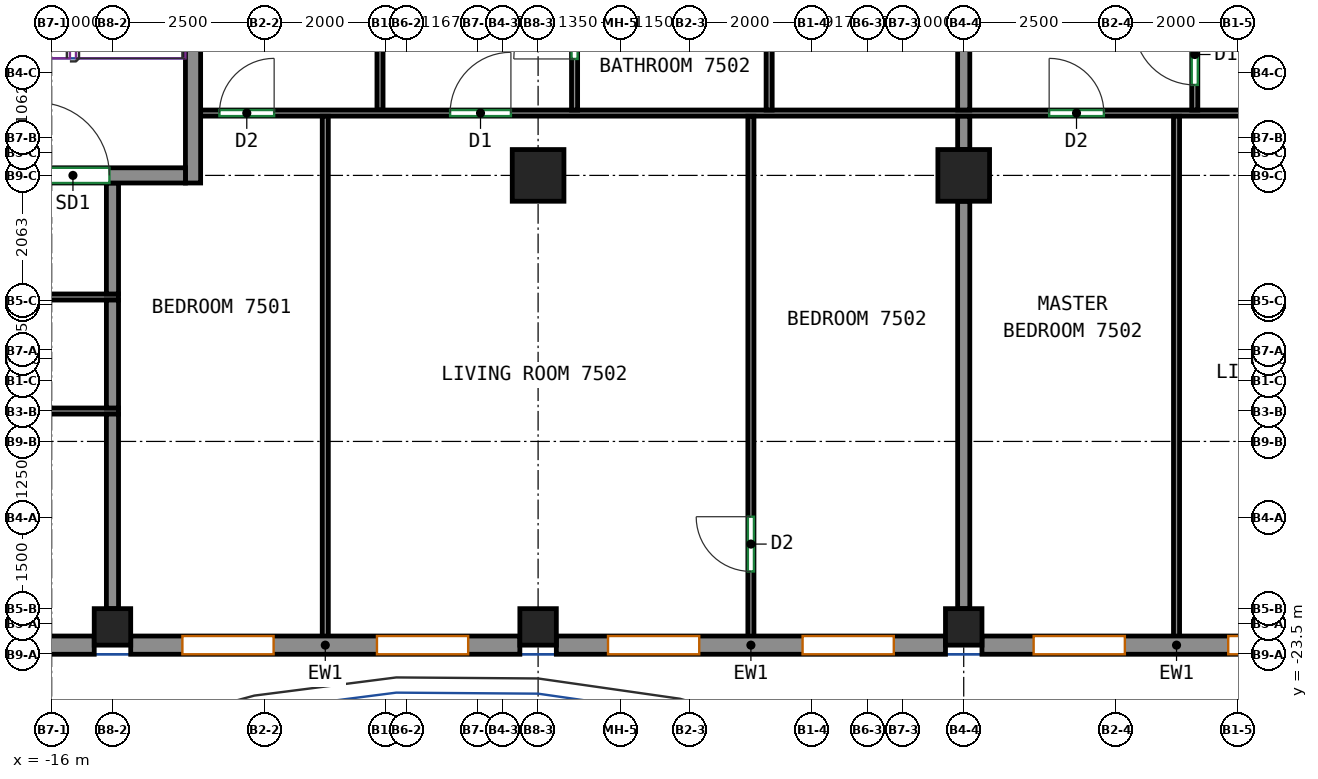
"""IFC4 building model, lengths in metres.
Left out: names, types, materials, properties, quantities, classifications, styles, units other than length and angle.
Written with IfcOpenShell. Run it as: python <this file> out.ifc"""

import sys

from ifc_helpers import new_model, si_unit, direction, frame, frame_2d, origin, origin_2d, place, context, subcontext, project, spatial, rectangle, extrude, source, transform, mapped, element, fill, save


model = new_model("IFC4")
c1 = context("Model", 3, precision=1e-05, world=origin(), true_north=direction((0.0, 1.0)))
c2 = subcontext(c1, "Body", "Model", "MODEL_VIEW")
j1 = project(units=[si_unit("LENGTHUNIT", "METRE"), si_unit("PLANEANGLEUNIT", "RADIAN")], contexts=[c1])
p1 = place(None, origin())
s1 = spatial("IfcSite", under=j1, at=p1, CompositionType="ELEMENT")
p2 = place(p1, origin())
s2 = spatial("IfcBuilding", under=s1, at=p2, CompositionType="ELEMENT")
p3 = place(p2, frame((0.0, 0.0, 301.8)))
s3 = spatial("IfcBuildingStorey", under=s2, at=p3, CompositionType="ELEMENT", Elevation=301.8)
m1 = source(origin(), c2, "Body", "SweptSolid", [
    extrude(rectangle(XDim=0.6, YDim=0.6, at=origin_2d()), origin(), (0.0, 0.0, 1.0), 3.12),
])
for number, where, z_axis, x_axis in (
    (1, (-15.0, -23.05, 0.0), (0.0, 0.0, 1.0), (1.0, 0.0, 0.0)),
    (2, (-8.0, -23.05, 0.0), (0.0, 0.0, 1.0), (1.0, 0.0, 0.0)),
):
    element("IfcColumn", number, at=place(p3, frame(where, z_axis=z_axis, x_axis=x_axis)), inside=s3, PredefinedType="COLUMN", context=c2, shape_type="MappedRepresentation", body=[
        mapped(m1, transform((0.0, 0.0, 0.0))),
    ])
m2 = source(origin(), c2, "Body", "SweptSolid", [
    extrude(rectangle(XDim=0.85, YDim=0.85, at=origin_2d()), origin(), (0.0, 0.0, 1.0), 3.12),
])
p4 = place(p3, frame((-8.0, -15.625, 0.0), z_axis=(0.0, 0.0, 1.0), x_axis=(1.0, 0.0, 0.0)))
e3 = element("IfcColumn", 3, at=p4, inside=s3, PredefinedType="COLUMN", context=c2, shape_type="MappedRepresentation", body=[
    mapped(m2, transform((0.0, 0.0, 0.0))),
])
p5 = place(p3, frame((-1.0, -23.05, 0.0), z_axis=(0.0, 0.0, 1.0), x_axis=(1.0, 0.0, 0.0)))
e4 = element("IfcColumn", 4, at=p5, inside=s3, PredefinedType="COLUMN", context=c2, shape_type="MappedRepresentation", body=[
    mapped(m1, transform((0.0, 0.0, 0.0))),
])
p6 = place(p3, frame((-1.0, -15.625, 0.0), z_axis=(0.0, 0.0, 1.0), x_axis=(1.0, 0.0, 0.0)))
e5 = element("IfcColumn", 5, at=p6, inside=s3, PredefinedType="COLUMN", context=c2, shape_type="MappedRepresentation", body=[
    mapped(m2, transform((0.0, 0.0, 0.0))),
])
m3 = source(origin(), c2, "Body", "SweptSolid", [
    extrude(rectangle(XDim=8.0, YDim=0.25, at=frame_2d((4.0, 0.0))), origin(), (0.0, 0.0, 1.0), 3.12),
])
p7 = place(p3, frame((-13.675, -15.75, 0.0), z_axis=(0.0, 0.0, 1.0), x_axis=(0.0, 1.0, 0.0)))
e6 = element("IfcWall", 6, at=p7, inside=s3, PredefinedType="SHEAR", context=c2, shape_type="MappedRepresentation", body=[
    mapped(m3, transform((0.0, 0.0, 0.0))),
])
m4 = source(origin(), c2, "Body", "SweptSolid", [
    extrude(rectangle(XDim=3.7, YDim=0.25, at=frame_2d((1.85, 0.0))), origin(), (0.0, 0.0, 1.0), 3.12),
])
p8 = place(p3, frame((-17.5, -15.625, 0.0), z_axis=(0.0, 0.0, 1.0), x_axis=(1.0, 0.0, 0.0)))
e7 = element("IfcWall", 7, at=p8, inside=s3, PredefinedType="SHEAR", context=c2, shape_type="MappedRepresentation", body=[
    mapped(m4, transform((0.0, 0.0, 0.0))),
])
p9 = place(p8, frame((1.25, 0.0, 0.0)))
e8 = element("IfcOpeningElement", 8, at=p9, cuts=e7, PredefinedType="OPENING", context=c2, shape_type="SweptSolid", body=[
    extrude(rectangle(XDim=1.2, YDim=2.1, at=frame_2d((0.6, 1.05))), frame((0.0, 0.135, 0.0), z_axis=(0.0, -1.0, 0.0), x_axis=(1.0, 0.0, 0.0)), (0.0, 0.0, 1.0), 0.27),
])
m5 = source(origin(), c2, "Body", "SweptSolid", [
    extrude(rectangle(XDim=6.4, YDim=0.3, at=frame_2d((3.2, 0.0))), origin(), (0.0, 0.0, 1.0), 3.12),
])
p10 = place(p3, frame((-21.7, -23.35, 0.0), z_axis=(0.0, 0.0, 1.0), x_axis=(1.0, 0.0, 0.0)))
e9 = element("IfcWall", 9, at=p10, inside=s3, PredefinedType="SOLIDWALL", context=c2, shape_type="MappedRepresentation", body=[
    mapped(m5, transform((0.0, 0.0, 0.0))),
])
p11 = place(p10, frame((0.85, 0.0, 0.8)))
e10 = element("IfcOpeningElement", 10, at=p11, cuts=e9, PredefinedType="OPENING", context=c2, shape_type="SweptSolid", body=[
    extrude(rectangle(XDim=1.5, YDim=2.05, at=frame_2d((0.75, 1.025))), frame((0.0, 0.16, 0.0), z_axis=(0.0, -1.0, 0.0), x_axis=(1.0, 0.0, 0.0)), (0.0, 0.0, 1.0), 0.32),
])
p12 = place(p10, frame((4.05, 0.0, 0.8)))
e11 = element("IfcOpeningElement", 11, at=p12, cuts=e9, PredefinedType="OPENING", context=c2, shape_type="SweptSolid", body=[
    extrude(rectangle(XDim=1.5, YDim=2.05, at=frame_2d((0.75, 1.025))), frame((0.0, 0.16, 0.0), z_axis=(0.0, -1.0, 0.0), x_axis=(1.0, 0.0, 0.0)), (0.0, 0.0, 1.0), 0.32),
])
p13 = place(p3, frame((-14.7, -23.35, 0.0), z_axis=(0.0, 0.0, 1.0), x_axis=(1.0, 0.0, 0.0)))
e12 = element("IfcWall", 12, at=p13, inside=s3, PredefinedType="SOLIDWALL", context=c2, shape_type="MappedRepresentation", body=[
    mapped(m5, transform((0.0, 0.0, 0.0))),
])
p14 = place(p13, frame((0.85, 0.0, 0.8)))
e13 = element("IfcOpeningElement", 13, at=p14, cuts=e12, PredefinedType="OPENING", context=c2, shape_type="SweptSolid", body=[
    extrude(rectangle(XDim=1.5, YDim=2.05, at=frame_2d((0.75, 1.025))), frame((0.0, 0.16, 0.0), z_axis=(0.0, -1.0, 0.0), x_axis=(1.0, 0.0, 0.0)), (0.0, 0.0, 1.0), 0.32),
])
p15 = place(p13, frame((4.05, 0.0, 0.8)))
e14 = element("IfcOpeningElement", 14, at=p15, cuts=e12, PredefinedType="OPENING", context=c2, shape_type="SweptSolid", body=[
    extrude(rectangle(XDim=1.5, YDim=2.05, at=frame_2d((0.75, 1.025))), frame((0.0, 0.16, 0.0), z_axis=(0.0, -1.0, 0.0), x_axis=(1.0, 0.0, 0.0)), (0.0, 0.0, 1.0), 0.32),
])
p16 = place(p3, frame((-7.7, -23.35, 0.0), z_axis=(0.0, 0.0, 1.0), x_axis=(1.0, 0.0, 0.0)))
e15 = element("IfcWall", 15, at=p16, inside=s3, PredefinedType="SOLIDWALL", context=c2, shape_type="MappedRepresentation", body=[
    mapped(m5, transform((0.0, 0.0, 0.0))),
])
p17 = place(p16, frame((0.85, 0.0, 0.8)))
e16 = element("IfcOpeningElement", 16, at=p17, cuts=e15, PredefinedType="OPENING", context=c2, shape_type="SweptSolid", body=[
    extrude(rectangle(XDim=1.5, YDim=2.05, at=frame_2d((0.75, 1.025))), frame((0.0, 0.16, 0.0), z_axis=(0.0, -1.0, 0.0), x_axis=(1.0, 0.0, 0.0)), (0.0, 0.0, 1.0), 0.32),
])
p18 = place(p16, frame((4.05, 0.0, 0.8)))
e17 = element("IfcOpeningElement", 17, at=p18, cuts=e15, PredefinedType="OPENING", context=c2, shape_type="SweptSolid", body=[
    extrude(rectangle(XDim=1.5, YDim=2.05, at=frame_2d((0.75, 1.025))), frame((0.0, 0.16, 0.0), z_axis=(0.0, -1.0, 0.0), x_axis=(1.0, 0.0, 0.0)), (0.0, 0.0, 1.0), 0.32),
])
p19 = place(p3, frame((-0.7, -23.35, 0.0), z_axis=(0.0, 0.0, 1.0), x_axis=(1.0, 0.0, 0.0)))
e18 = element("IfcWall", 18, at=p19, inside=s3, PredefinedType="SOLIDWALL", context=c2, shape_type="MappedRepresentation", body=[
    mapped(m5, transform((0.0, 0.0, 0.0))),
])
p20 = place(p19, frame((0.85, 0.0, 0.8)))
e19 = element("IfcOpeningElement", 19, at=p20, cuts=e18, PredefinedType="OPENING", context=c2, shape_type="SweptSolid", body=[
    extrude(rectangle(XDim=1.5, YDim=2.05, at=frame_2d((0.75, 1.025))), frame((0.0, 0.16, 0.0), z_axis=(0.0, -1.0, 0.0), x_axis=(1.0, 0.0, 0.0)), (0.0, 0.0, 1.0), 0.32),
])
p21 = place(p19, frame((4.05, 0.0, 0.8)))
e20 = element("IfcOpeningElement", 20, at=p21, cuts=e18, PredefinedType="OPENING", context=c2, shape_type="SweptSolid", body=[
    extrude(rectangle(XDim=1.5, YDim=2.05, at=frame_2d((0.75, 1.025))), frame((0.0, 0.16, 0.0), z_axis=(0.0, -1.0, 0.0), x_axis=(1.0, 0.0, 0.0)), (0.0, 0.0, 1.0), 0.32),
])
p22 = place(p3, frame((-14.9, -19.5, 0.0), z_axis=(0.0, 0.0, 1.0), x_axis=(-1.0, 0.0, 0.0)))
e21 = element("IfcWall", 21, at=p22, inside=s3, PredefinedType="PARTITIONING", context=c2, shape_type="SweptSolid", body=[
    extrude(rectangle(XDim=10.35, YDim=0.1, at=frame_2d((5.175, 0.0))), origin(), (0.0, 0.0, 1.0), 3.12),
])
p23 = place(p22, frame((1.206, 0.0, 0.0)))
e22 = element("IfcOpeningElement", 22, at=p23, cuts=e21, PredefinedType="OPENING", context=c2, shape_type="SweptSolid", body=[
    extrude(rectangle(XDim=0.9, YDim=2.1, at=frame_2d((0.45, 1.05))), frame((0.0, 0.06, 0.0), z_axis=(0.0, -1.0, 0.0), x_axis=(1.0, 0.0, 0.0)), (0.0, 0.0, 1.0), 0.12),
])
p24 = place(p3, frame((-15.0, -22.75, 0.0), z_axis=(0.0, 0.0, 1.0), x_axis=(0.0, 1.0, 0.0)))
e23 = element("IfcWall", 23, at=p24, inside=s3, PredefinedType="PARTITIONING", context=c2, shape_type="SweptSolid", body=[
    extrude(rectangle(XDim=3.2, YDim=0.2, at=frame_2d((1.6, 0.0))), origin(), (0.0, 0.0, 1.0), 3.12),
])
p25 = place(p3, frame((-14.9, -17.625, 0.0), z_axis=(0.0, 0.0, 1.0), x_axis=(-1.0, 0.0, 0.0)))
e24 = element("IfcWall", 24, at=p25, inside=s3, PredefinedType="PARTITIONING", context=c2, shape_type="SweptSolid", body=[
    extrude(rectangle(XDim=10.35, YDim=0.1, at=frame_2d((5.175, 0.0))), origin(), (0.0, 0.0, 1.0), 3.12),
])
p26 = place(p25, frame((8.546, 0.0, 0.0)))
e25 = element("IfcOpeningElement", 25, at=p26, cuts=e24, PredefinedType="OPENING", context=c2, shape_type="SweptSolid", body=[
    extrude(rectangle(XDim=0.9, YDim=2.1, at=frame_2d((0.45, 1.05))), frame((0.0, 0.06, 0.0), z_axis=(0.0, -1.0, 0.0), x_axis=(1.0, 0.0, 0.0)), (0.0, 0.0, 1.0), 0.12),
])
p27 = place(p3, frame((-15.0, -19.45, 0.0), z_axis=(0.0, 0.0, 1.0), x_axis=(0.0, 1.0, 0.0)))
e26 = element("IfcWall", 26, at=p27, inside=s3, PredefinedType="PARTITIONING", context=c2, shape_type="SweptSolid", body=[
    extrude(rectangle(XDim=1.775, YDim=0.2, at=frame_2d((0.887, 0.0))), origin(), (0.0, 0.0, 1.0), 3.12),
])
p28 = place(p3, frame((-15.0, -17.575, 0.0), z_axis=(0.0, 0.0, 1.0), x_axis=(0.0, 1.0, 0.0)))
e27 = element("IfcWall", 27, at=p28, inside=s3, PredefinedType="PARTITIONING", context=c2, shape_type="SweptSolid", body=[
    extrude(rectangle(XDim=1.825, YDim=0.2, at=frame_2d((0.913, 0.0))), origin(), (0.0, 0.0, 1.0), 3.12),
])
p29 = place(p3, frame((-10.6, -14.55, 0.0), z_axis=(0.0, 0.0, 1.0), x_axis=(0.0, 1.0, 0.0)))
e28 = element("IfcWall", 28, at=p29, inside=s3, PredefinedType="PARTITIONING", context=c2, shape_type="SweptSolid", body=[
    extrude(rectangle(XDim=2.573, YDim=0.1, at=frame_2d((1.287, 0.0))), origin(), (0.0, 0.0, 1.0), 3.12),
])
p30 = place(p29, frame((1.373, 0.0, 0.0)))
e29 = element("IfcOpeningElement", 29, at=p30, cuts=e28, PredefinedType="OPENING", context=c2, shape_type="SweptSolid", body=[
    extrude(rectangle(XDim=1.0, YDim=2.1, at=frame_2d((0.5, 1.05))), frame((0.0, 0.06, 0.0), z_axis=(0.0, -1.0, 0.0), x_axis=(1.0, 0.0, 0.0)), (0.0, 0.0, 1.0), 0.12),
])
p31 = place(p3, frame((-13.55, -14.6, 0.0), z_axis=(0.0, 0.0, 1.0), x_axis=(1.0, 0.0, 0.0)))
e30 = element("IfcWall", 30, at=p31, inside=s3, PredefinedType="PARTITIONING", context=c2, shape_type="SweptSolid", body=[
    extrude(rectangle(XDim=31.3, YDim=0.1, at=frame_2d((15.65, 0.0))), origin(), (0.0, 0.0, 1.0), 3.12),
])
p32 = place(p31, frame((0.309, 0.0, 0.0)))
e31 = element("IfcOpeningElement", 31, at=p32, cuts=e30, PredefinedType="OPENING", context=c2, shape_type="SweptSolid", body=[
    extrude(rectangle(XDim=0.9, YDim=2.1, at=frame_2d((0.45, 1.05))), frame((0.0, 0.06, 0.0), z_axis=(0.0, -1.0, 0.0), x_axis=(1.0, 0.0, 0.0)), (0.0, 0.0, 1.0), 0.12),
])
p33 = place(p31, frame((4.103, 0.0, 0.0)))
e32 = element("IfcOpeningElement", 32, at=p33, cuts=e30, PredefinedType="OPENING", context=c2, shape_type="SweptSolid", body=[
    extrude(rectangle(XDim=1.0, YDim=2.1, at=frame_2d((0.5, 1.05))), frame((0.0, 0.06, 0.0), z_axis=(0.0, -1.0, 0.0), x_axis=(1.0, 0.0, 0.0)), (0.0, 0.0, 1.0), 0.12),
])
p34 = place(p31, frame((13.955, 0.0, 0.0)))
e33 = element("IfcOpeningElement", 33, at=p34, cuts=e30, PredefinedType="OPENING", context=c2, shape_type="SweptSolid", body=[
    extrude(rectangle(XDim=0.9, YDim=2.1, at=frame_2d((0.45, 1.05))), frame((0.0, 0.06, 0.0), z_axis=(0.0, -1.0, 0.0), x_axis=(1.0, 0.0, 0.0)), (0.0, 0.0, 1.0), 0.12),
])
p35 = place(p31, frame((17.453, 0.0, 0.0)))
e34 = element("IfcOpeningElement", 34, at=p35, cuts=e30, PredefinedType="OPENING", context=c2, shape_type="SweptSolid", body=[
    extrude(rectangle(XDim=1.0, YDim=2.1, at=frame_2d((0.5, 1.05))), frame((0.0, 0.06, 0.0), z_axis=(0.0, -1.0, 0.0), x_axis=(1.0, 0.0, 0.0)), (0.0, 0.0, 1.0), 0.12),
])
p36 = place(p31, frame((23.13, 0.0, 0.0)))
e35 = element("IfcOpeningElement", 35, at=p36, cuts=e30, PredefinedType="OPENING", context=c2, shape_type="SweptSolid", body=[
    extrude(rectangle(XDim=1.0, YDim=2.1, at=frame_2d((0.5, 1.05))), frame((0.0, 0.06, 0.0), z_axis=(0.0, -1.0, 0.0), x_axis=(1.0, 0.0, 0.0)), (0.0, 0.0, 1.0), 0.12),
])
p37 = place(p3, frame((-7.4, -14.55, 0.0), z_axis=(0.0, 0.0, 1.0), x_axis=(0.0, 1.0, 0.0)))
e36 = element("IfcWall", 36, at=p37, inside=s3, PredefinedType="PARTITIONING", context=c2, shape_type="SweptSolid", body=[
    extrude(rectangle(XDim=2.573, YDim=0.1, at=frame_2d((1.287, 0.0))), origin(), (0.0, 0.0, 1.0), 3.12),
])
p38 = place(p37, frame((0.84, 0.0, 0.0)))
e37 = element("IfcOpeningElement", 37, at=p38, cuts=e36, PredefinedType="OPENING", context=c2, shape_type="SweptSolid", body=[
    extrude(rectangle(XDim=1.0, YDim=2.1, at=frame_2d((0.5, 1.05))), frame((0.0, 0.06, 0.0), z_axis=(0.0, -1.0, 0.0), x_axis=(1.0, 0.0, 0.0)), (0.0, 0.0, 1.0), 0.12),
])
p39 = place(p3, frame((-4.2, -14.55, 0.0), z_axis=(0.0, 0.0, 1.0), x_axis=(0.0, 1.0, 0.0)))
e38 = element("IfcWall", 38, at=p39, inside=s3, PredefinedType="PARTITIONING", context=c2, shape_type="SweptSolid", body=[
    extrude(rectangle(XDim=2.573, YDim=0.1, at=frame_2d((1.287, 0.0))), origin(), (0.0, 0.0, 1.0), 3.12),
])
p40 = place(p39, frame((1.261, 0.0, 0.0)))
e39 = element("IfcOpeningElement", 39, at=p40, cuts=e38, PredefinedType="OPENING", context=c2, shape_type="SweptSolid", body=[
    extrude(rectangle(XDim=0.9, YDim=2.1, at=frame_2d((0.45, 1.05))), frame((0.0, 0.06, 0.0), z_axis=(0.0, -1.0, 0.0), x_axis=(1.0, 0.0, 0.0)), (0.0, 0.0, 1.0), 0.12),
])
p41 = place(p3, frame((-1.0, -14.55, 0.0), z_axis=(0.0, 0.0, 1.0), x_axis=(0.0, 1.0, 0.0)))
e40 = element("IfcWall", 40, at=p41, inside=s3, PredefinedType="PARTITIONING", context=c2, shape_type="SweptSolid", body=[
    extrude(rectangle(XDim=2.573, YDim=0.2, at=frame_2d((1.287, 0.0))), origin(), (0.0, 0.0, 1.0), 3.12),
])
p42 = place(p3, frame((-11.5, -23.25, 0.0), z_axis=(0.0, 0.0, 1.0), x_axis=(0.0, 1.0, 0.0)))
e41 = element("IfcWall", 41, at=p42, inside=s3, PredefinedType="PARTITIONING", context=c2, shape_type="SweptSolid", body=[
    extrude(rectangle(XDim=8.598, YDim=0.1, at=frame_2d((4.299, 0.0))), origin(), (0.0, 0.0, 1.0), 3.12),
])
p43 = place(p3, frame((-4.5, -23.25, 0.0), z_axis=(0.0, 0.0, 1.0), x_axis=(0.0, 1.0, 0.0)))
e42 = element("IfcWall", 42, at=p43, inside=s3, PredefinedType="PARTITIONING", context=c2, shape_type="SweptSolid", body=[
    extrude(rectangle(XDim=8.598, YDim=0.1, at=frame_2d((4.299, 0.0))), origin(), (0.0, 0.0, 1.0), 3.12),
])
p44 = place(p43, frame((1.112, 0.0, 0.0)))
e43 = element("IfcOpeningElement", 43, at=p44, cuts=e42, PredefinedType="OPENING", context=c2, shape_type="SweptSolid", body=[
    extrude(rectangle(XDim=0.9, YDim=2.1, at=frame_2d((0.45, 1.05))), frame((0.0, 0.06, 0.0), z_axis=(0.0, -1.0, 0.0), x_axis=(1.0, 0.0, 0.0)), (0.0, 0.0, 1.0), 0.12),
])
p45 = place(p3, frame((-1.0, -15.2, 0.0), z_axis=(0.0, 0.0, 1.0), x_axis=(0.0, 1.0, 0.0)))
e44 = element("IfcWall", 44, at=p45, inside=s3, PredefinedType="PARTITIONING", context=c2, shape_type="SweptSolid", body=[
    extrude(rectangle(XDim=0.548, YDim=0.2, at=frame_2d((0.274, 0.0))), origin(), (0.0, 0.0, 1.0), 3.12),
])
p46 = place(p3, frame((-1.0, -22.75, 0.0), z_axis=(0.0, 0.0, 1.0), x_axis=(0.0, 1.0, 0.0)))
e45 = element("IfcWall", 45, at=p46, inside=s3, PredefinedType="PARTITIONING", context=c2, shape_type="SweptSolid", body=[
    extrude(rectangle(XDim=6.7, YDim=0.2, at=frame_2d((3.35, 0.0))), origin(), (0.0, 0.0, 1.0), 3.12),
])
p47 = place(p3, frame((2.8, -14.55, 0.0), z_axis=(0.0, 0.0, 1.0), x_axis=(0.0, 1.0, 0.0)))
e46 = element("IfcWall", 46, at=p47, inside=s3, PredefinedType="PARTITIONING", context=c2, shape_type="SweptSolid", body=[
    extrude(rectangle(XDim=2.573, YDim=0.1, at=frame_2d((1.287, 0.0))), origin(), (0.0, 0.0, 1.0), 3.12),
])
p48 = place(p47, frame((0.413, 0.0, 0.0)))
e47 = element("IfcOpeningElement", 47, at=p48, cuts=e46, PredefinedType="OPENING", context=c2, shape_type="SweptSolid", body=[
    extrude(rectangle(XDim=1.0, YDim=2.1, at=frame_2d((0.5, 1.05))), frame((0.0, 0.06, 0.0), z_axis=(0.0, -1.0, 0.0), x_axis=(1.0, 0.0, 0.0)), (0.0, 0.0, 1.0), 0.12),
])
p49 = place(p3, frame((2.5, -23.25, 0.0), z_axis=(0.0, 0.0, 1.0), x_axis=(0.0, 1.0, 0.0)))
e48 = element("IfcWall", 48, at=p49, inside=s3, PredefinedType="PARTITIONING", context=c2, shape_type="SweptSolid", body=[
    extrude(rectangle(XDim=8.598, YDim=0.1, at=frame_2d((4.299, 0.0))), origin(), (0.0, 0.0, 1.0), 3.12),
])
p50 = place(p14, origin())
e49 = element("IfcWindow", 49, at=p50, inside=s3, PartitioningType="SINGLE_PANEL", PredefinedType="WINDOW", context=c2, shape_type="SweptSolid", body=[
    extrude(rectangle(XDim=1.5, YDim=2.05, at=frame_2d((0.75, 1.025))), frame((0.0, 0.03, 0.0), z_axis=(0.0, -1.0, 0.0), x_axis=(1.0, 0.0, 0.0)), (0.0, 0.0, 1.0), 0.06),
])
fill(e13, e49)
p51 = place(p15, origin())
e50 = element("IfcWindow", 50, at=p51, inside=s3, PartitioningType="SINGLE_PANEL", PredefinedType="WINDOW", context=c2, shape_type="SweptSolid", body=[
    extrude(rectangle(XDim=1.5, YDim=2.05, at=frame_2d((0.75, 1.025))), frame((0.0, 0.03, 0.0), z_axis=(0.0, -1.0, 0.0), x_axis=(1.0, 0.0, 0.0)), (0.0, 0.0, 1.0), 0.06),
])
fill(e14, e50)
p52 = place(p17, origin())
e51 = element("IfcWindow", 51, at=p52, inside=s3, PartitioningType="SINGLE_PANEL", PredefinedType="WINDOW", context=c2, shape_type="SweptSolid", body=[
    extrude(rectangle(XDim=1.5, YDim=2.05, at=frame_2d((0.75, 1.025))), frame((0.0, 0.03, 0.0), z_axis=(0.0, -1.0, 0.0), x_axis=(1.0, 0.0, 0.0)), (0.0, 0.0, 1.0), 0.06),
])
fill(e16, e51)
p53 = place(p18, origin())
e52 = element("IfcWindow", 52, at=p53, inside=s3, PartitioningType="SINGLE_PANEL", PredefinedType="WINDOW", context=c2, shape_type="SweptSolid", body=[
    extrude(rectangle(XDim=1.5, YDim=2.05, at=frame_2d((0.75, 1.025))), frame((0.0, 0.03, 0.0), z_axis=(0.0, -1.0, 0.0), x_axis=(1.0, 0.0, 0.0)), (0.0, 0.0, 1.0), 0.06),
])
fill(e17, e52)
p54 = place(p20, origin())
e53 = element("IfcWindow", 53, at=p54, inside=s3, PartitioningType="SINGLE_PANEL", PredefinedType="WINDOW", context=c2, shape_type="SweptSolid", body=[
    extrude(rectangle(XDim=1.5, YDim=2.05, at=frame_2d((0.75, 1.025))), frame((0.0, 0.03, 0.0), z_axis=(0.0, -1.0, 0.0), x_axis=(1.0, 0.0, 0.0)), (0.0, 0.0, 1.0), 0.06),
])
fill(e19, e53)
p55 = place(p21, origin())
e54 = element("IfcWindow", 54, at=p55, inside=s3, PartitioningType="SINGLE_PANEL", PredefinedType="WINDOW", context=c2, shape_type="SweptSolid", body=[
    extrude(rectangle(XDim=1.5, YDim=2.05, at=frame_2d((0.75, 1.025))), frame((0.0, 0.03, 0.0), z_axis=(0.0, -1.0, 0.0), x_axis=(1.0, 0.0, 0.0)), (0.0, 0.0, 1.0), 0.06),
])
fill(e20, e54)
p56 = place(p9, origin())
e55 = element("IfcDoor", 55, at=p56, inside=s3, OperationType="DOUBLE_DOOR_SINGLE_SWING", PredefinedType="DOOR", context=c2, shape_type="SweptSolid", body=[
    extrude(rectangle(XDim=1.2, YDim=2.1, at=frame_2d((0.6, 1.05))), frame((0.0, 0.025, 0.0), z_axis=(0.0, -1.0, 0.0), x_axis=(1.0, 0.0, 0.0)), (0.0, 0.0, 1.0), 0.05),
])
fill(e8, e55)
p57 = place(p44, origin())
e56 = element("IfcDoor", 56, at=p57, inside=s3, OperationType="SINGLE_SWING_RIGHT", PredefinedType="DOOR", context=c2, shape_type="SweptSolid", body=[
    extrude(rectangle(XDim=0.9, YDim=2.1, at=frame_2d((0.45, 1.05))), frame((0.0, 0.025, 0.0), z_axis=(0.0, -1.0, 0.0), x_axis=(1.0, 0.0, 0.0)), (0.0, 0.0, 1.0), 0.05),
])
fill(e43, e56)
p58 = place(p32, origin())
e57 = element("IfcDoor", 57, at=p58, inside=s3, OperationType="SINGLE_SWING_RIGHT", PredefinedType="DOOR", context=c2, shape_type="SweptSolid", body=[
    extrude(rectangle(XDim=0.9, YDim=2.1, at=frame_2d((0.45, 1.05))), frame((0.0, 0.025, 0.0), z_axis=(0.0, -1.0, 0.0), x_axis=(1.0, 0.0, 0.0)), (0.0, 0.0, 1.0), 0.05),
])
fill(e31, e57)
p59 = place(p33, origin())
e58 = element("IfcDoor", 58, at=p59, inside=s3, OperationType="SINGLE_SWING_RIGHT", PredefinedType="DOOR", context=c2, shape_type="SweptSolid", body=[
    extrude(rectangle(XDim=1.0, YDim=2.1, at=frame_2d((0.5, 1.05))), frame((0.0, 0.025, 0.0), z_axis=(0.0, -1.0, 0.0), x_axis=(1.0, 0.0, 0.0)), (0.0, 0.0, 1.0), 0.05),
])
fill(e32, e58)
p60 = place(p34, origin())
e59 = element("IfcDoor", 59, at=p60, inside=s3, OperationType="SINGLE_SWING_LEFT", PredefinedType="DOOR", context=c2, shape_type="SweptSolid", body=[
    extrude(rectangle(XDim=0.9, YDim=2.1, at=frame_2d((0.45, 1.05))), frame((0.0, 0.025, 0.0), z_axis=(0.0, -1.0, 0.0), x_axis=(1.0, 0.0, 0.0)), (0.0, 0.0, 1.0), 0.05),
])
fill(e33, e59)
p61 = place(p48, origin())
e60 = element("IfcDoor", 60, at=p61, inside=s3, OperationType="SINGLE_SWING_RIGHT", PredefinedType="DOOR", context=c2, shape_type="SweptSolid", body=[
    extrude(rectangle(XDim=1.0, YDim=2.1, at=frame_2d((0.5, 1.05))), frame((0.0, 0.025, 0.0), z_axis=(0.0, -1.0, 0.0), x_axis=(1.0, 0.0, 0.0)), (0.0, 0.0, 1.0), 0.05),
])
fill(e47, e60)
p62 = place(p38, origin())
e61 = element("IfcDoor", 61, at=p62, inside=s3, OperationType="SINGLE_SWING_LEFT", PredefinedType="DOOR", context=c2, shape_type="SweptSolid", body=[
    extrude(rectangle(XDim=1.0, YDim=2.1, at=frame_2d((0.5, 1.05))), frame((0.0, 0.025, 0.0), z_axis=(0.0, -1.0, 0.0), x_axis=(1.0, 0.0, 0.0)), (0.0, 0.0, 1.0), 0.05),
])
fill(e37, e61)
save(model, sys.argv[1])
